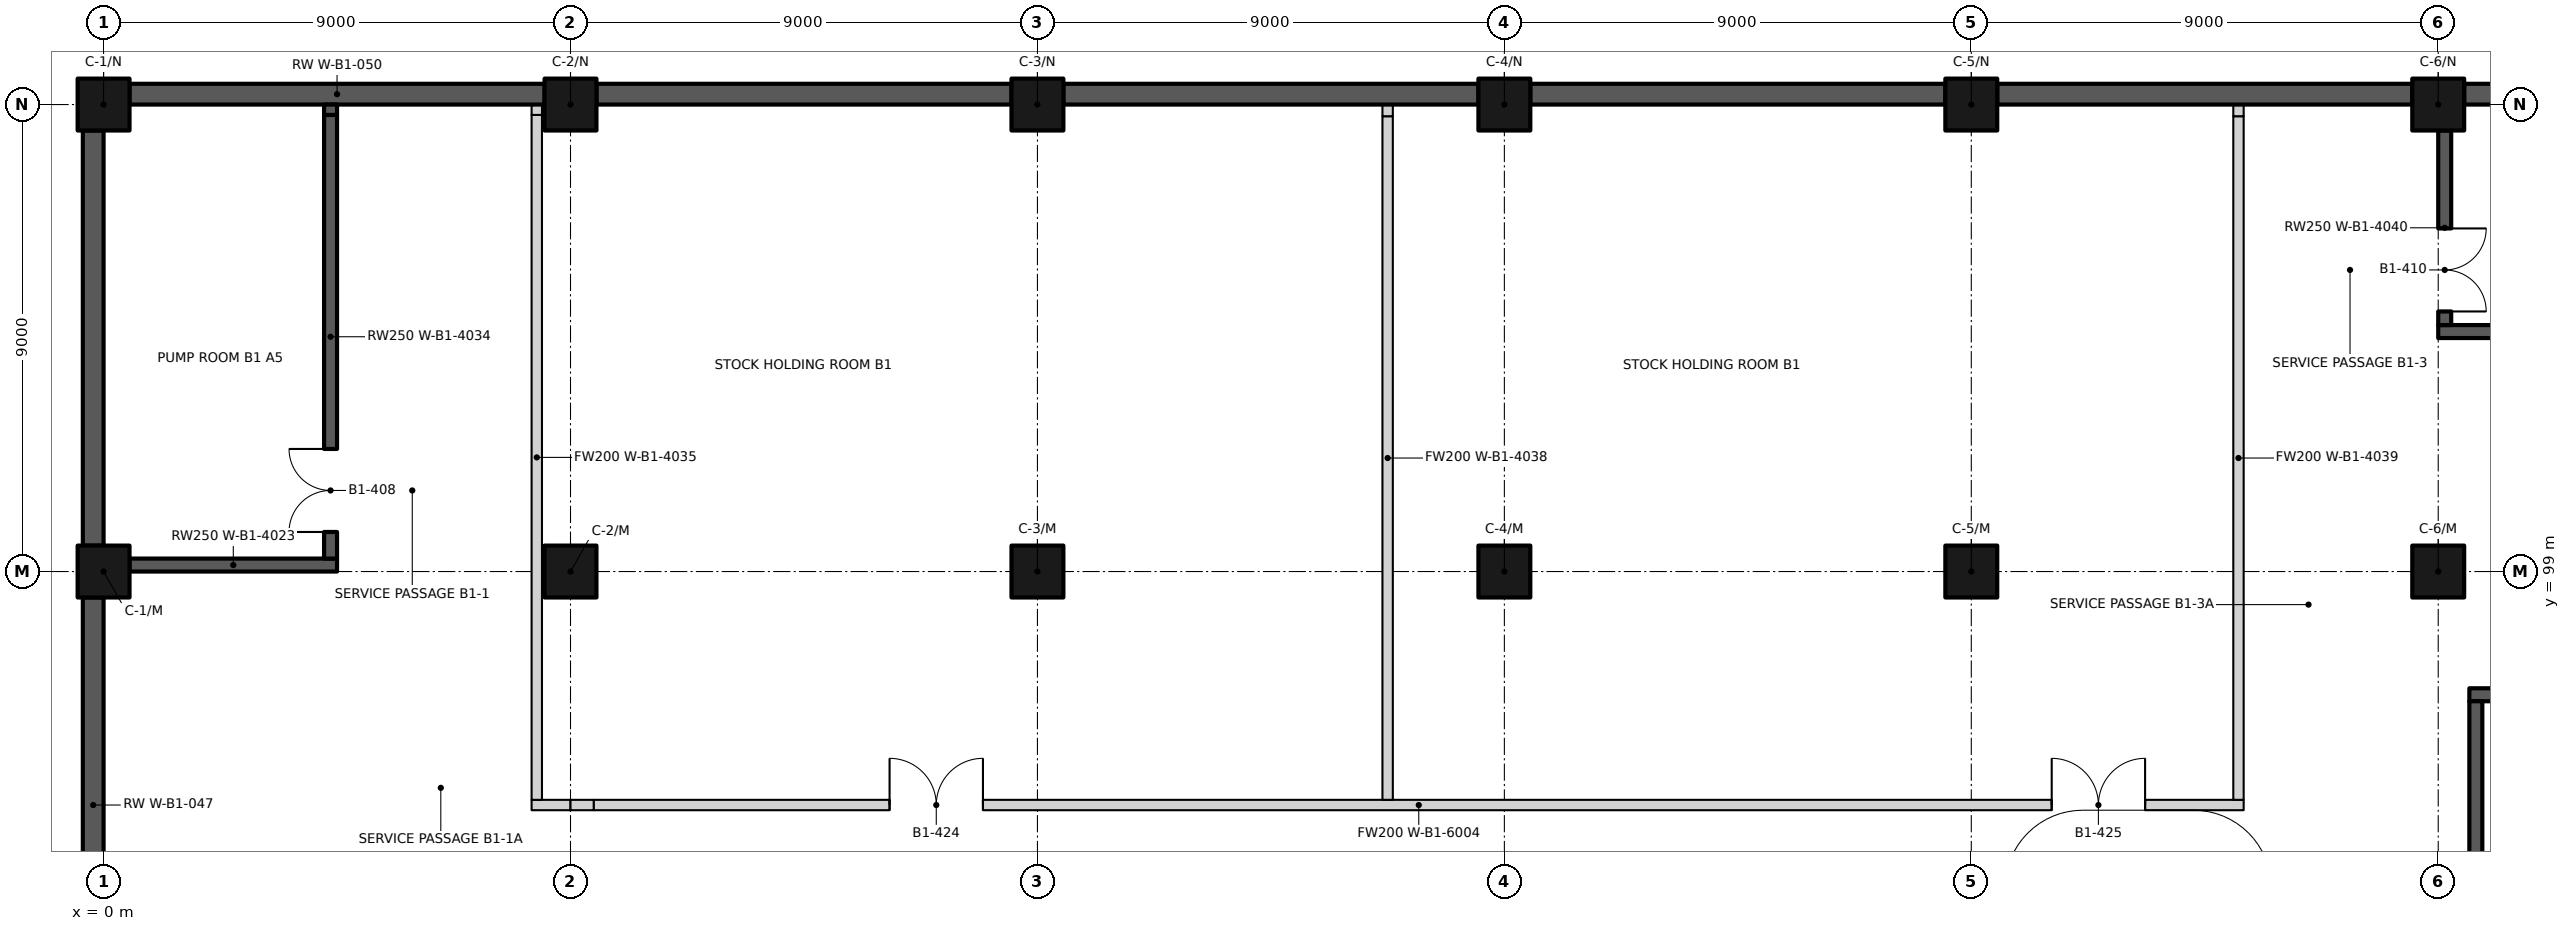
"""IFC4 building model, lengths in metres.
Left out: names, types, materials, properties, quantities, classifications, styles, units other than length and angle.
Written with IfcOpenShell. Run it as: python <this file> out.ifc"""

import sys

from ifc_helpers import new_model, si_unit, direction, frame, frame_2d, origin, origin_2d, place, context, subcontext, project, spatial, rectangle, extrude, element, fill, save


model = new_model("IFC4")
c1 = context("Model", 3, precision=1e-05, world=origin(), true_north=direction((0.0, 1.0)))
c2 = subcontext(c1, "Body", "Model", "MODEL_VIEW")
j1 = project(units=[si_unit("LENGTHUNIT", "METRE"), si_unit("PLANEANGLEUNIT", "RADIAN")], contexts=[c1])
p1 = place(None, origin())
s1 = spatial("IfcSite", under=j1, at=p1, CompositionType="ELEMENT")
p2 = place(p1, origin())
s2 = spatial("IfcBuilding", under=s1, at=p2, CompositionType="ELEMENT")
p3 = place(p2, frame((0.0, 0.0, -5.1)))
s3 = spatial("IfcBuildingStorey", under=s2, at=p3, CompositionType="ELEMENT", Elevation=-5.1)
for number, where, z_axis, x_axis in (
    (1, (-0.2, 90.5, 0.0), (0.0, 0.0, 1.0), (0.0, 1.0, 0.0)),
    (2, (-0.2, 99.5, 0.0), (0.0, 0.0, 1.0), (0.0, 1.0, 0.0)),
    (3, (0.5, 108.2, 0.0), (0.0, 0.0, 1.0), (1.0, 0.0, 0.0)),
    (4, (9.5, 108.2, 0.0), (0.0, 0.0, 1.0), (1.0, 0.0, 0.0)),
    (5, (18.5, 108.2, 0.0), (0.0, 0.0, 1.0), (1.0, 0.0, 0.0)),
    (6, (27.5, 108.2, 0.0), (0.0, 0.0, 1.0), (1.0, 0.0, 0.0)),
    (7, (36.5, 108.2, 0.0), (0.0, 0.0, 1.0), (1.0, 0.0, 0.0)),
    (8, (45.5, 108.2, 0.0), (0.0, 0.0, 1.0), (1.0, 0.0, 0.0)),
):
    element("IfcWall", number, at=place(p3, frame(where, z_axis=z_axis, x_axis=x_axis)), inside=s3, PredefinedType="SOLIDWALL", context=c2, shape_type="SweptSolid", body=[
        extrude(rectangle(XDim=8.0, YDim=0.4, at=frame_2d((4.0, 0.0))), origin(), (0.0, 0.0, 1.0), 5.1),
    ])
for number, where, z_axis, x_axis in (
    (9, (0.0, 99.0, 0.0), (0.0, 0.0, 1.0), (1.0, 0.0, 0.0)),
    (10, (9.0, 99.0, 0.0), (0.0, 0.0, 1.0), (1.0, 0.0, 0.0)),
    (11, (18.0, 99.0, 0.0), (0.0, 0.0, 1.0), (1.0, 0.0, 0.0)),
    (12, (27.0, 99.0, 0.0), (0.0, 0.0, 1.0), (1.0, 0.0, 0.0)),
    (13, (36.0, 99.0, 0.0), (0.0, 0.0, 1.0), (1.0, 0.0, 0.0)),
    (14, (45.0, 99.0, 0.0), (0.0, 0.0, 1.0), (1.0, 0.0, 0.0)),
    (15, (0.0, 108.0, 0.0), (0.0, 0.0, 1.0), (1.0, 0.0, 0.0)),
    (16, (9.0, 108.0, 0.0), (0.0, 0.0, 1.0), (1.0, 0.0, 0.0)),
    (17, (18.0, 108.0, 0.0), (0.0, 0.0, 1.0), (1.0, 0.0, 0.0)),
    (18, (27.0, 108.0, 0.0), (0.0, 0.0, 1.0), (1.0, 0.0, 0.0)),
    (19, (36.0, 108.0, 0.0), (0.0, 0.0, 1.0), (1.0, 0.0, 0.0)),
    (20, (45.0, 108.0, 0.0), (0.0, 0.0, 1.0), (1.0, 0.0, 0.0)),
):
    element("IfcColumn", number, at=place(p3, frame(where, z_axis=z_axis, x_axis=x_axis)), inside=s3, PredefinedType="COLUMN", context=c2, shape_type="SweptSolid", body=[
        extrude(rectangle(XDim=1.0, YDim=1.0, at=origin_2d()), origin(), (0.0, 0.0, 1.0), 5.1),
    ])
p4 = place(p3, frame((45.6, 96.625, 0.0), z_axis=(0.0, 0.0, 1.0), x_axis=(1.0, 0.0, 0.0)))
e21 = element("IfcWall", 21, at=p4, inside=s3, PredefinedType="SHEAR", context=c2, shape_type="SweptSolid", body=[
    extrude(rectangle(XDim=7.15, YDim=0.25, at=frame_2d((3.575, 0.0))), origin(), (0.0, 0.0, 1.0), 5.1),
])
p5 = place(p4, frame((1.15, 0.0, 0.0)))
e22 = element("IfcOpeningElement", 22, at=p5, cuts=e21, PredefinedType="OPENING", context=c2, shape_type="SweptSolid", body=[
    extrude(rectangle(XDim=1.4, YDim=2.1, at=frame_2d((0.7, 1.05))), frame((0.0, 0.135, 0.0), z_axis=(0.0, -1.0, 0.0), x_axis=(1.0, 0.0, 0.0)), (0.0, 0.0, 1.0), 0.27),
])
p6 = place(p4, frame((4.6, 0.0, 0.0)))
e23 = element("IfcOpeningElement", 23, at=p6, cuts=e21, PredefinedType="OPENING", context=c2, shape_type="SweptSolid", body=[
    extrude(rectangle(XDim=1.4, YDim=2.1, at=frame_2d((0.7, 1.05))), frame((0.0, 0.135, 0.0), z_axis=(0.0, -1.0, 0.0), x_axis=(1.0, 0.0, 0.0)), (0.0, 0.0, 1.0), 0.27),
])
p7 = place(p3, frame((45.725, 92.5, 0.0), z_axis=(0.0, 0.0, 1.0), x_axis=(0.0, 1.0, 0.0)))
e24 = element("IfcWall", 24, at=p7, inside=s3, PredefinedType="SHEAR", context=c2, shape_type="SweptSolid", body=[
    extrude(rectangle(XDim=4.0, YDim=0.25, at=frame_2d((2.0, 0.0))), origin(), (0.0, 0.0, 1.0), 5.1),
])
p8 = place(p3, frame((8.25, 94.5, 0.0), z_axis=(0.0, 0.0, 1.0), x_axis=(1.0, 0.0, 0.0)))
e25 = element("IfcWall", 25, at=p8, inside=s3, PredefinedType="PARTITIONING", context=c2, shape_type="SweptSolid", body=[
    extrude(rectangle(XDim=0.75, YDim=0.2, at=frame_2d((0.375, 0.0))), origin(), (0.0, 0.0, 1.0), 4.75),
])
p9 = place(p3, frame((9.0, 94.5, 0.0), z_axis=(0.0, 0.0, 1.0), x_axis=(1.0, 0.0, 0.0)))
e26 = element("IfcWall", 26, at=p9, inside=s3, PredefinedType="PARTITIONING", context=c2, shape_type="SweptSolid", body=[
    extrude(rectangle(XDim=0.45, YDim=0.2, at=frame_2d((0.225, 0.0))), origin(), (0.0, 0.0, 1.0), 4.2),
])
p10 = place(p3, frame((9.45, 94.5, 0.0), z_axis=(0.0, 0.0, 1.0), x_axis=(1.0, 0.0, 0.0)))
e27 = element("IfcWall", 27, at=p10, inside=s3, PredefinedType="PARTITIONING", context=c2, shape_type="SweptSolid", body=[
    extrude(rectangle(XDim=31.8, YDim=0.2, at=frame_2d((15.9, 0.0))), origin(), (0.0, 0.0, 1.0), 4.75),
])
p11 = place(p10, frame((5.7, 0.0, 0.0)))
e28 = element("IfcOpeningElement", 28, at=p11, cuts=e27, PredefinedType="OPENING", context=c2, shape_type="SweptSolid", body=[
    extrude(rectangle(XDim=1.8, YDim=2.4, at=frame_2d((0.9, 1.2))), frame((0.0, 0.11, 0.0), z_axis=(0.0, -1.0, 0.0), x_axis=(1.0, 0.0, 0.0)), (0.0, 0.0, 1.0), 0.22),
])
p12 = place(p10, frame((28.1, 0.0, 0.0)))
e29 = element("IfcOpeningElement", 29, at=p12, cuts=e27, PredefinedType="OPENING", context=c2, shape_type="SweptSolid", body=[
    extrude(rectangle(XDim=1.8, YDim=2.4, at=frame_2d((0.9, 1.2))), frame((0.0, 0.11, 0.0), z_axis=(0.0, -1.0, 0.0), x_axis=(1.0, 0.0, 0.0)), (0.0, 0.0, 1.0), 0.22),
])
p13 = place(p3, frame((0.5, 99.125, 0.0), z_axis=(0.0, 0.0, 1.0), x_axis=(1.0, 0.0, 0.0)))
e30 = element("IfcWall", 30, at=p13, inside=s3, PredefinedType="SOLIDWALL", context=c2, shape_type="SweptSolid", body=[
    extrude(rectangle(XDim=4.0, YDim=0.25, at=frame_2d((2.0, 0.0))), origin(), (0.0, 0.0, 1.0), 4.75),
])
p14 = place(p3, frame((45.0, 103.625, 0.0), z_axis=(0.0, 0.0, 1.0), x_axis=(1.0, 0.0, 0.0)))
e31 = element("IfcWall", 31, at=p14, inside=s3, PredefinedType="SOLIDWALL", context=c2, shape_type="SweptSolid", body=[
    extrude(rectangle(XDim=9.0, YDim=0.25, at=frame_2d((4.5, 0.0))), origin(), (0.0, 0.0, 1.0), 4.75),
])
p15 = place(p3, frame((4.375, 99.25, 0.0), z_axis=(0.0, 0.0, 1.0), x_axis=(0.0, 1.0, 0.0)))
e32 = element("IfcWall", 32, at=p15, inside=s3, PredefinedType="SOLIDWALL", context=c2, shape_type="SweptSolid", body=[
    extrude(rectangle(XDim=8.55, YDim=0.25, at=frame_2d((4.275, 0.0))), origin(), (0.0, 0.0, 1.0), 4.75),
])
p16 = place(p15, frame((0.512, 0.0, 0.0)))
e33 = element("IfcOpeningElement", 33, at=p16, cuts=e32, PredefinedType="OPENING", context=c2, shape_type="SweptSolid", body=[
    extrude(rectangle(XDim=1.6, YDim=2.1, at=frame_2d((0.8, 1.05))), frame((0.0, 0.135, 0.0), z_axis=(0.0, -1.0, 0.0), x_axis=(1.0, 0.0, 0.0)), (0.0, 0.0, 1.0), 0.27),
])
p17 = place(p3, frame((4.375, 107.8, 0.0), z_axis=(0.0, 0.0, 1.0), x_axis=(0.0, 1.0, 0.0)))
e34 = element("IfcWall", 34, at=p17, inside=s3, PredefinedType="SOLIDWALL", context=c2, shape_type="SweptSolid", body=[
    extrude(rectangle(XDim=0.2, YDim=0.25, at=frame_2d((0.1, 0.0))), origin(), (0.0, 0.0, 1.0), 4.3),
])
p18 = place(p3, frame((8.35, 94.6, 0.0), z_axis=(0.0, 0.0, 1.0), x_axis=(0.0, 1.0, 0.0)))
e35 = element("IfcWall", 35, at=p18, inside=s3, PredefinedType="PARTITIONING", context=c2, shape_type="SweptSolid", body=[
    extrude(rectangle(XDim=13.2, YDim=0.2, at=frame_2d((6.6, 0.0))), origin(), (0.0, 0.0, 1.0), 4.75),
])
p19 = place(p3, frame((8.35, 107.8, 0.0), z_axis=(0.0, 0.0, 1.0), x_axis=(0.0, 1.0, 0.0)))
e36 = element("IfcWall", 36, at=p19, inside=s3, PredefinedType="PARTITIONING", context=c2, shape_type="SweptSolid", body=[
    extrude(rectangle(XDim=0.2, YDim=0.2, at=frame_2d((0.1, 0.0))), origin(), (0.0, 0.0, 1.0), 4.3),
])
p20 = place(p3, frame((24.75, 94.6, 0.0), z_axis=(0.0, 0.0, 1.0), x_axis=(0.0, 1.0, 0.0)))
e37 = element("IfcWall", 37, at=p20, inside=s3, PredefinedType="PARTITIONING", context=c2, shape_type="SweptSolid", body=[
    extrude(rectangle(XDim=13.175, YDim=0.2, at=frame_2d((6.587, 0.0))), origin(), (0.0, 0.0, 1.0), 4.75),
])
p21 = place(p3, frame((24.75, 107.775, 0.0), z_axis=(0.0, 0.0, 1.0), x_axis=(0.0, 1.0, 0.0)))
e38 = element("IfcWall", 38, at=p21, inside=s3, PredefinedType="PARTITIONING", context=c2, shape_type="SweptSolid", body=[
    extrude(rectangle(XDim=0.225, YDim=0.2, at=frame_2d((0.113, 0.0))), origin(), (0.0, 0.0, 1.0), 4.2),
])
p22 = place(p3, frame((41.15, 94.6, 0.0), z_axis=(0.0, 0.0, 1.0), x_axis=(0.0, 1.0, 0.0)))
e39 = element("IfcWall", 39, at=p22, inside=s3, PredefinedType="PARTITIONING", context=c2, shape_type="SweptSolid", body=[
    extrude(rectangle(XDim=13.175, YDim=0.2, at=frame_2d((6.587, 0.0))), origin(), (0.0, 0.0, 1.0), 4.75),
])
p23 = place(p3, frame((41.15, 107.775, 0.0), z_axis=(0.0, 0.0, 1.0), x_axis=(0.0, 1.0, 0.0)))
e40 = element("IfcWall", 40, at=p23, inside=s3, PredefinedType="PARTITIONING", context=c2, shape_type="SweptSolid", body=[
    extrude(rectangle(XDim=0.225, YDim=0.2, at=frame_2d((0.113, 0.0))), origin(), (0.0, 0.0, 1.0), 4.2),
])
p24 = place(p3, frame((45.125, 103.75, 0.0), z_axis=(0.0, 0.0, 1.0), x_axis=(0.0, 1.0, 0.0)))
e41 = element("IfcWall", 41, at=p24, inside=s3, PredefinedType="SOLIDWALL", context=c2, shape_type="SweptSolid", body=[
    extrude(rectangle(XDim=3.75, YDim=0.25, at=frame_2d((1.875, 0.0))), origin(), (0.0, 0.0, 1.0), 4.75),
])
p25 = place(p24, frame((1.863, 0.0, 0.0), z_axis=(0.0, 0.0, 1.0), x_axis=(-1.0, 0.0, 0.0)))
e42 = element("IfcOpeningElement", 42, at=p25, cuts=e41, PredefinedType="OPENING", context=c2, shape_type="SweptSolid", body=[
    extrude(rectangle(XDim=1.6, YDim=2.1, at=frame_2d((0.8, 1.05))), frame((0.0, 0.135, 0.0), z_axis=(0.0, -1.0, 0.0), x_axis=(1.0, 0.0, 0.0)), (0.0, 0.0, 1.0), 0.27),
])
p26 = place(p16, origin())
e43 = element("IfcDoor", 43, at=p26, inside=s3, OperationType="DOUBLE_DOOR_SINGLE_SWING", PredefinedType="DOOR", context=c2, shape_type="SweptSolid", body=[
    extrude(rectangle(XDim=1.6, YDim=2.1, at=frame_2d((0.8, 1.05))), frame((0.0, 0.025, 0.0), z_axis=(0.0, -1.0, 0.0), x_axis=(1.0, 0.0, 0.0)), (0.0, 0.0, 1.0), 0.05),
])
fill(e33, e43)
p27 = place(p25, origin())
e44 = element("IfcDoor", 44, at=p27, inside=s3, OperationType="DOUBLE_DOOR_SINGLE_SWING", PredefinedType="DOOR", context=c2, shape_type="SweptSolid", body=[
    extrude(rectangle(XDim=1.6, YDim=2.1, at=frame_2d((0.8, 1.05))), frame((0.0, 0.025, 0.0), z_axis=(0.0, -1.0, 0.0), x_axis=(1.0, 0.0, 0.0)), (0.0, 0.0, 1.0), 0.05),
])
fill(e42, e44)
p28 = place(p11, origin())
e45 = element("IfcDoor", 45, at=p28, inside=s3, OperationType="DOUBLE_DOOR_SINGLE_SWING", PredefinedType="DOOR", context=c2, shape_type="SweptSolid", body=[
    extrude(rectangle(XDim=1.8, YDim=2.4, at=frame_2d((0.9, 1.2))), frame((0.0, 0.025, 0.0), z_axis=(0.0, -1.0, 0.0), x_axis=(1.0, 0.0, 0.0)), (0.0, 0.0, 1.0), 0.05),
])
fill(e28, e45)
p29 = place(p12, origin())
e46 = element("IfcDoor", 46, at=p29, inside=s3, OperationType="DOUBLE_DOOR_SINGLE_SWING", PredefinedType="DOOR", context=c2, shape_type="SweptSolid", body=[
    extrude(rectangle(XDim=1.8, YDim=2.4, at=frame_2d((0.9, 1.2))), frame((0.0, 0.025, 0.0), z_axis=(0.0, -1.0, 0.0), x_axis=(1.0, 0.0, 0.0)), (0.0, 0.0, 1.0), 0.05),
])
fill(e29, e46)
save(model, sys.argv[1])
